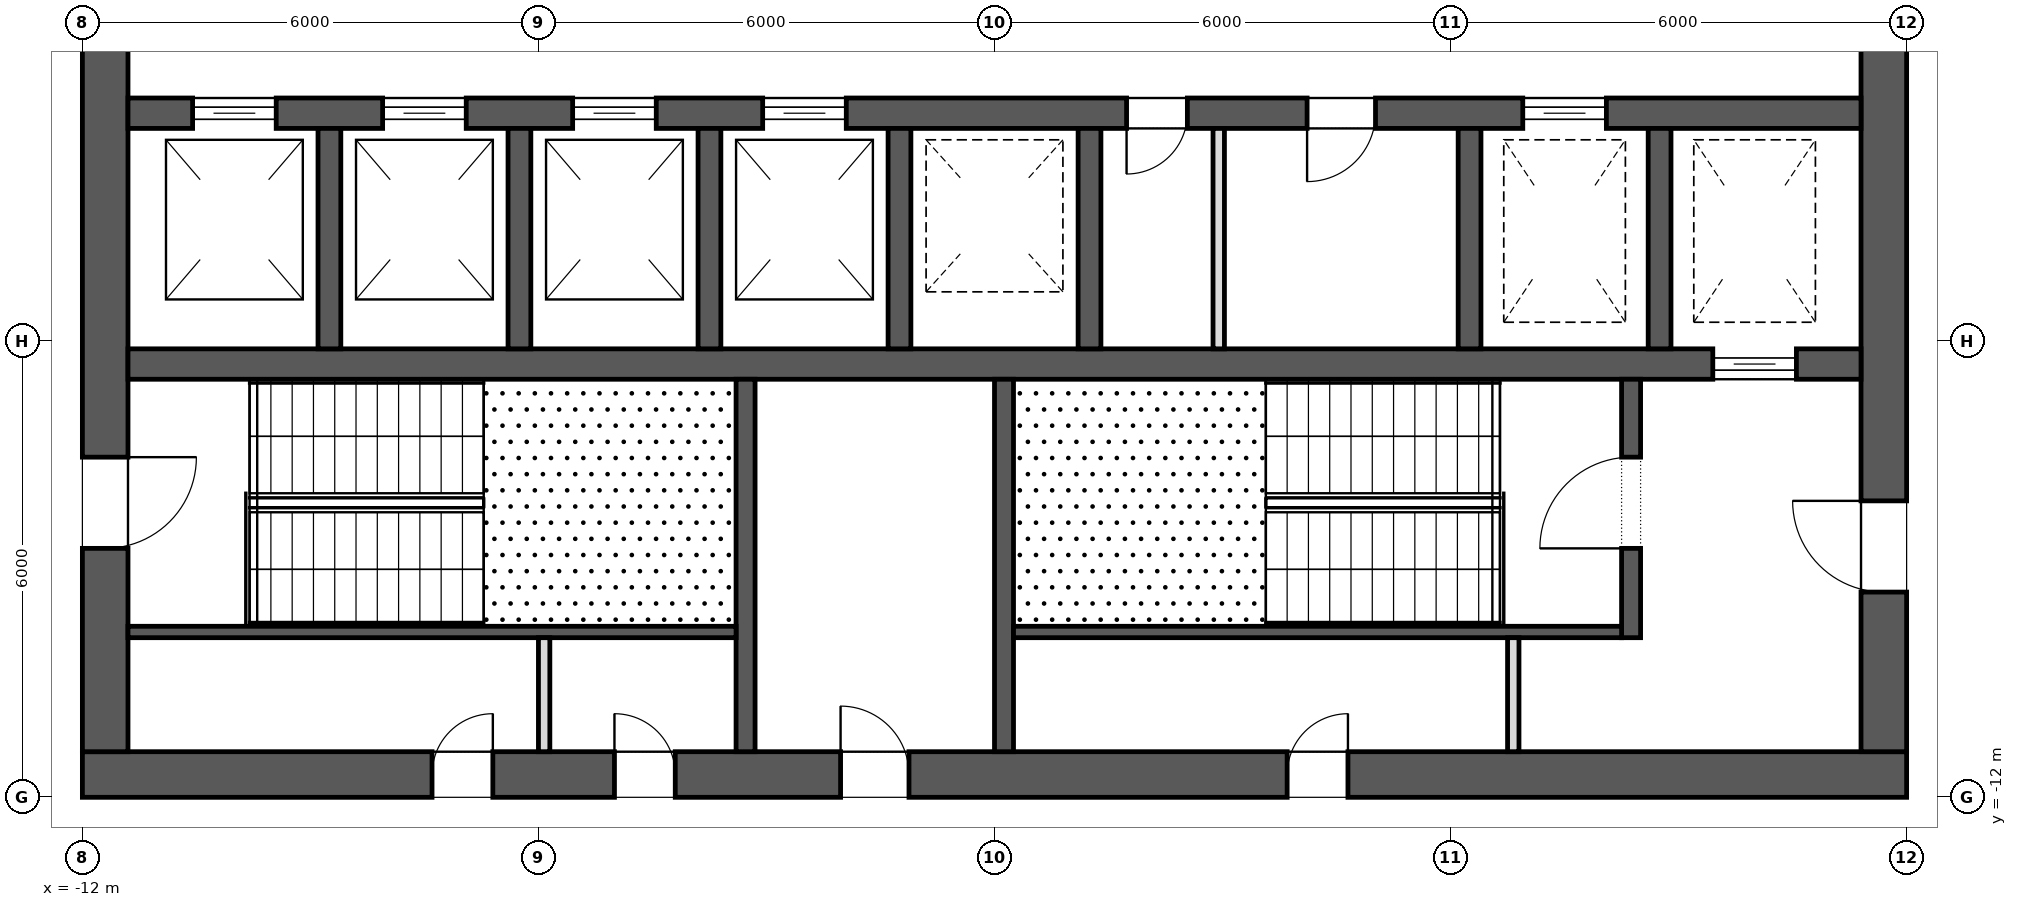
"""IFC4 building model, lengths in metres.
Left out: names, types, materials, properties, quantities, classifications, styles, units other than length and angle.
Written with IfcOpenShell. Run it as: python <this file> out.ifc"""

import sys

from ifc_helpers import new_model, si_unit, direction, frame, frame_2d, origin, place, context, subcontext, project, spatial, rectangle, extrude, element, fill, save


model = new_model("IFC4")
c1 = context("Model", 3, precision=1e-05, world=origin(), true_north=direction((0.0, 1.0)))
c2 = subcontext(c1, "Body", "Model", "MODEL_VIEW")
j1 = project(units=[si_unit("LENGTHUNIT", "METRE"), si_unit("PLANEANGLEUNIT", "RADIAN")], contexts=[c1])
p1 = place(None, origin())
s1 = spatial("IfcSite", under=j1, at=p1, CompositionType="ELEMENT")
p2 = place(p1, origin())
s2 = spatial("IfcBuilding", under=s1, at=p2, CompositionType="ELEMENT")
p3 = place(p2, frame((0.0, 0.0, 214.9)))
s3 = spatial("IfcBuildingStorey", under=s2, at=p3, CompositionType="ELEMENT", Elevation=214.9)
p4 = place(p3, frame((-12.0, -11.7, 0.0), z_axis=(0.0, 0.0, 1.0), x_axis=(1.0, 0.0, 0.0)))
e1 = element("IfcWall", 1, at=p4, inside=s3, PredefinedType="SHEAR", context=c2, shape_type="SweptSolid", body=[
    extrude(rectangle(XDim=24.0, YDim=0.6, at=frame_2d((12.0, 0.0))), origin(), (0.0, 0.0, 1.0), 4.0),
])
p5 = place(p4, frame((9.975, 0.0, 0.0)))
e2 = element("IfcOpeningElement", 2, at=p5, cuts=e1, PredefinedType="OPENING", context=c2, shape_type="SweptSolid", body=[
    extrude(rectangle(XDim=0.9, YDim=2.1, at=frame_2d((0.45, 1.05))), frame((0.0, 0.312, 0.0), z_axis=(0.0, -1.0, 0.0), x_axis=(1.0, 0.0, 0.0)), (0.0, 0.0, 1.0), 0.624),
])
p6 = place(p4, frame((4.6, 0.0, 0.0)))
e3 = element("IfcOpeningElement", 3, at=p6, cuts=e1, PredefinedType="OPENING", context=c2, shape_type="SweptSolid", body=[
    extrude(rectangle(XDim=0.8, YDim=2.1, at=frame_2d((0.4, 1.05))), frame((0.0, 0.312, 0.0), z_axis=(0.0, -1.0, 0.0), x_axis=(1.0, 0.0, 0.0)), (0.0, 0.0, 1.0), 0.624),
])
p7 = place(p4, frame((7.0, 0.0, 0.0)))
e4 = element("IfcOpeningElement", 4, at=p7, cuts=e1, PredefinedType="OPENING", context=c2, shape_type="SweptSolid", body=[
    extrude(rectangle(XDim=0.8, YDim=2.1, at=frame_2d((0.4, 1.05))), frame((0.0, 0.312, 0.0), z_axis=(0.0, -1.0, 0.0), x_axis=(1.0, 0.0, 0.0)), (0.0, 0.0, 1.0), 0.624),
])
p8 = place(p4, frame((15.85, 0.0, 0.0)))
e5 = element("IfcOpeningElement", 5, at=p8, cuts=e1, PredefinedType="OPENING", context=c2, shape_type="SweptSolid", body=[
    extrude(rectangle(XDim=0.8, YDim=2.1, at=frame_2d((0.4, 1.05))), frame((0.0, 0.312, 0.0), z_axis=(0.0, -1.0, 0.0), x_axis=(1.0, 0.0, 0.0)), (0.0, 0.0, 1.0), 0.624),
])
p9 = place(p3, frame((11.7, -11.4, 0.0), z_axis=(0.0, 0.0, 1.0), x_axis=(0.0, 1.0, 0.0)))
e6 = element("IfcWall", 6, at=p9, inside=s3, PredefinedType="SHEAR", context=c2, shape_type="SweptSolid", body=[
    extrude(rectangle(XDim=22.8, YDim=0.6, at=frame_2d((11.4, 0.0))), origin(), (0.0, 0.0, 1.0), 4.0),
])
p10 = place(p9, frame((10.2, 0.0, 0.0)))
e7 = element("IfcOpeningElement", 7, at=p10, cuts=e6, PredefinedType="OPENING", context=c2, shape_type="SweptSolid", body=[
    extrude(rectangle(XDim=2.4, YDim=2.1, at=frame_2d((1.2, 1.05))), frame((0.0, 0.312, 0.0), z_axis=(0.0, -1.0, 0.0), x_axis=(1.0, 0.0, 0.0)), (0.0, 0.0, 1.0), 0.624),
])
p11 = place(p9, frame((19.5, 0.0, 0.0)))
e8 = element("IfcOpeningElement", 8, at=p11, cuts=e6, PredefinedType="OPENING", context=c2, shape_type="SweptSolid", body=[
    extrude(rectangle(XDim=1.2, YDim=2.1, at=frame_2d((0.6, 1.05))), frame((0.0, 0.312, 0.0), z_axis=(0.0, -1.0, 0.0), x_axis=(1.0, 0.0, 0.0)), (0.0, 0.0, 1.0), 0.624),
])
p12 = place(p9, frame((2.1, 0.0, 0.0)))
e9 = element("IfcOpeningElement", 9, at=p12, cuts=e6, PredefinedType="OPENING", context=c2, shape_type="SweptSolid", body=[
    extrude(rectangle(XDim=1.2, YDim=2.1, at=frame_2d((0.6, 1.05))), frame((0.0, 0.312, 0.0), z_axis=(0.0, -1.0, 0.0), x_axis=(1.0, 0.0, 0.0)), (0.0, 0.0, 1.0), 0.624),
])
p13 = place(p3, frame((-11.7, -11.4, 0.0), z_axis=(0.0, 0.0, 1.0), x_axis=(0.0, 1.0, 0.0)))
e10 = element("IfcWall", 10, at=p13, inside=s3, PredefinedType="SHEAR", context=c2, shape_type="SweptSolid", body=[
    extrude(rectangle(XDim=22.8, YDim=0.6, at=frame_2d((11.4, 0.0))), origin(), (0.0, 0.0, 1.0), 4.0),
])
p14 = place(p13, frame((10.2, 0.0, 0.0)))
e11 = element("IfcOpeningElement", 11, at=p14, cuts=e10, PredefinedType="OPENING", context=c2, shape_type="SweptSolid", body=[
    extrude(rectangle(XDim=2.4, YDim=2.1, at=frame_2d((1.2, 1.05))), frame((0.0, 0.312, 0.0), z_axis=(0.0, -1.0, 0.0), x_axis=(1.0, 0.0, 0.0)), (0.0, 0.0, 1.0), 0.624),
])
p15 = place(p13, frame((18.925, 0.0, 0.0)))
e12 = element("IfcOpeningElement", 12, at=p15, cuts=e10, PredefinedType="OPENING", context=c2, shape_type="SweptSolid", body=[
    extrude(rectangle(XDim=1.2, YDim=2.1, at=frame_2d((0.6, 1.05))), frame((0.0, 0.312, 0.0), z_axis=(0.0, -1.0, 0.0), x_axis=(1.0, 0.0, 0.0)), (0.0, 0.0, 1.0), 0.624),
])
p16 = place(p13, frame((2.675, 0.0, 0.0)))
e13 = element("IfcOpeningElement", 13, at=p16, cuts=e10, PredefinedType="OPENING", context=c2, shape_type="SweptSolid", body=[
    extrude(rectangle(XDim=1.2, YDim=2.1, at=frame_2d((0.6, 1.05))), frame((0.0, 0.312, 0.0), z_axis=(0.0, -1.0, 0.0), x_axis=(1.0, 0.0, 0.0)), (0.0, 0.0, 1.0), 0.624),
])
p17 = place(p3, frame((-11.4, -3.0, 0.0), z_axis=(0.0, 0.0, 1.0), x_axis=(1.0, 0.0, 0.0)))
e14 = element("IfcWall", 14, at=p17, inside=s3, PredefinedType="SHEAR", context=c2, shape_type="SweptSolid", body=[
    extrude(rectangle(XDim=22.8, YDim=0.4, at=frame_2d((11.4, 0.0))), origin(), (0.0, 0.0, 1.0), 4.0),
])
p18 = place(p17, frame((0.85, 0.0, 0.0)))
e15 = element("IfcOpeningElement", 15, at=p18, cuts=e14, PredefinedType="OPENING", context=c2, shape_type="SweptSolid", body=[
    extrude(rectangle(XDim=1.1, YDim=2.1, at=frame_2d((0.55, 1.05))), frame((0.0, 0.212, 0.0), z_axis=(0.0, -1.0, 0.0), x_axis=(1.0, 0.0, 0.0)), (0.0, 0.0, 1.0), 0.424),
])
p19 = place(p17, frame((3.35, 0.0, 0.0)))
e16 = element("IfcOpeningElement", 16, at=p19, cuts=e14, PredefinedType="OPENING", context=c2, shape_type="SweptSolid", body=[
    extrude(rectangle(XDim=1.1, YDim=2.1, at=frame_2d((0.55, 1.05))), frame((0.0, 0.212, 0.0), z_axis=(0.0, -1.0, 0.0), x_axis=(1.0, 0.0, 0.0)), (0.0, 0.0, 1.0), 0.424),
])
p20 = place(p17, frame((5.85, 0.0, 0.0)))
e17 = element("IfcOpeningElement", 17, at=p20, cuts=e14, PredefinedType="OPENING", context=c2, shape_type="SweptSolid", body=[
    extrude(rectangle(XDim=1.1, YDim=2.1, at=frame_2d((0.55, 1.05))), frame((0.0, 0.212, 0.0), z_axis=(0.0, -1.0, 0.0), x_axis=(1.0, 0.0, 0.0)), (0.0, 0.0, 1.0), 0.424),
])
p21 = place(p17, frame((8.35, 0.0, 0.0)))
e18 = element("IfcOpeningElement", 18, at=p21, cuts=e14, PredefinedType="OPENING", context=c2, shape_type="SweptSolid", body=[
    extrude(rectangle(XDim=1.1, YDim=2.1, at=frame_2d((0.55, 1.05))), frame((0.0, 0.212, 0.0), z_axis=(0.0, -1.0, 0.0), x_axis=(1.0, 0.0, 0.0)), (0.0, 0.0, 1.0), 0.424),
])
p22 = place(p17, frame((18.35, 0.0, 0.0)))
e19 = element("IfcOpeningElement", 19, at=p22, cuts=e14, PredefinedType="OPENING", context=c2, shape_type="SweptSolid", body=[
    extrude(rectangle(XDim=1.1, YDim=2.1, at=frame_2d((0.55, 1.05))), frame((0.0, 0.212, 0.0), z_axis=(0.0, -1.0, 0.0), x_axis=(1.0, 0.0, 0.0)), (0.0, 0.0, 1.0), 0.424),
])
p23 = place(p17, frame((13.137, 0.0, 0.0)))
e20 = element("IfcOpeningElement", 20, at=p23, cuts=e14, PredefinedType="OPENING", context=c2, shape_type="SweptSolid", body=[
    extrude(rectangle(XDim=0.8, YDim=2.1, at=frame_2d((0.4, 1.05))), frame((0.0, 0.212, 0.0), z_axis=(0.0, -1.0, 0.0), x_axis=(1.0, 0.0, 0.0)), (0.0, 0.0, 1.0), 0.424),
])
p24 = place(p17, frame((15.512, 0.0, 0.0)))
e21 = element("IfcOpeningElement", 21, at=p24, cuts=e14, PredefinedType="OPENING", context=c2, shape_type="SweptSolid", body=[
    extrude(rectangle(XDim=0.9, YDim=2.1, at=frame_2d((0.45, 1.05))), frame((0.0, 0.212, 0.0), z_axis=(0.0, -1.0, 0.0), x_axis=(1.0, 0.0, 0.0)), (0.0, 0.0, 1.0), 0.424),
])
p25 = place(p3, frame((-11.4, -6.3, 0.0), z_axis=(0.0, 0.0, 1.0), x_axis=(1.0, 0.0, 0.0)))
e22 = element("IfcWall", 22, at=p25, inside=s3, PredefinedType="SHEAR", context=c2, shape_type="SweptSolid", body=[
    extrude(rectangle(XDim=22.8, YDim=0.4, at=frame_2d((11.4, 0.0))), origin(), (0.0, 0.0, 1.0), 4.0),
])
p26 = place(p25, frame((20.85, 0.0, 0.0)))
e23 = element("IfcOpeningElement", 23, at=p26, cuts=e22, PredefinedType="OPENING", context=c2, shape_type="SweptSolid", body=[
    extrude(rectangle(XDim=1.1, YDim=2.1, at=frame_2d((0.55, 1.05))), frame((0.0, 0.212, 0.0), z_axis=(0.0, -1.0, 0.0), x_axis=(1.0, 0.0, 0.0)), (0.0, 0.0, 1.0), 0.424),
])
for number, where, z_axis, x_axis in (
    (24, (-8.75, -6.1, 0.0), (0.0, 0.0, 1.0), (0.0, 1.0, 0.0)),
    (25, (-6.25, -6.1, 0.0), (0.0, 0.0, 1.0), (0.0, 1.0, 0.0)),
    (26, (-3.75, -6.1, 0.0), (0.0, 0.0, 1.0), (0.0, 1.0, 0.0)),
    (27, (-1.25, -6.1, 0.0), (0.0, 0.0, 1.0), (0.0, 1.0, 0.0)),
    (28, (1.25, -6.1, 0.0), (0.0, 0.0, 1.0), (0.0, 1.0, 0.0)),
    (29, (6.25, -6.1, 0.0), (0.0, 0.0, 1.0), (0.0, 1.0, 0.0)),
    (30, (8.75, -6.1, 0.0), (0.0, 0.0, 1.0), (0.0, 1.0, 0.0)),
):
    element("IfcWall", number, at=place(p3, frame(where, z_axis=z_axis, x_axis=x_axis)), inside=s3, PredefinedType="SHEAR", context=c2, shape_type="SweptSolid", body=[
        extrude(rectangle(XDim=2.9, YDim=0.3, at=frame_2d((1.45, 0.0))), origin(), (0.0, 0.0, 1.0), 4.0),
    ])
for number, where, z_axis, x_axis in (
    (31, (-3.275, -11.4, 0.0), (0.0, 0.0, 1.0), (0.0, 1.0, 0.0)),
    (32, (0.125, -11.4, 0.0), (0.0, 0.0, 1.0), (0.0, 1.0, 0.0)),
):
    element("IfcWall", number, at=place(p3, frame(where, z_axis=z_axis, x_axis=x_axis)), inside=s3, PredefinedType="SHEAR", context=c2, shape_type="SweptSolid", body=[
        extrude(rectangle(XDim=4.9, YDim=0.25, at=frame_2d((2.45, 0.0))), origin(), (0.0, 0.0, 1.0), 3.7),
    ])
p27 = place(p3, frame((8.375, -9.9, 0.0), z_axis=(0.0, 0.0, 1.0), x_axis=(0.0, 1.0, 0.0)))
e33 = element("IfcWall", 33, at=p27, inside=s3, PredefinedType="SHEAR", context=c2, shape_type="SweptSolid", body=[
    extrude(rectangle(XDim=3.4, YDim=0.25, at=frame_2d((1.7, 0.0))), origin(), (0.0, 0.0, 1.0), 3.7),
])
p28 = place(p27, frame((1.175, 0.0, 0.0)))
e34 = element("IfcOpeningElement", 34, at=p28, cuts=e33, PredefinedType="OPENING", context=c2, shape_type="SweptSolid", body=[
    extrude(rectangle(XDim=1.2, YDim=2.1, at=frame_2d((0.6, 1.05))), frame((0.0, 0.137, 0.0), z_axis=(0.0, -1.0, 0.0), x_axis=(1.0, 0.0, 0.0)), (0.0, 0.0, 1.0), 0.274),
])
for number, where, z_axis, x_axis in (
    (35, (-11.4, -9.825, 0.0), (0.0, 0.0, 1.0), (1.0, 0.0, 0.0)),
    (36, (0.25, -9.825, 0.0), (0.0, 0.0, 1.0), (1.0, 0.0, 0.0)),
):
    element("IfcWall", number, at=place(p3, frame(where, z_axis=z_axis, x_axis=x_axis)), inside=s3, PredefinedType="SHEAR", context=c2, shape_type="SweptSolid", body=[
        extrude(rectangle(XDim=8.0, YDim=0.15, at=frame_2d((4.0, 0.0))), origin(), (0.0, 0.0, 1.0), 3.7),
    ])
for number, where, z_axis, x_axis in (
    (37, (-5.925, -11.4, 0.0), (0.0, 0.0, 1.0), (0.0, 1.0, 0.0)),
    (38, (6.825, -11.4, 0.0), (0.0, 0.0, 1.0), (0.0, 1.0, 0.0)),
):
    element("IfcWall", number, at=place(p3, frame(where, z_axis=z_axis, x_axis=x_axis)), inside=s3, PredefinedType="PARTITIONING", context=c2, shape_type="SweptSolid", body=[
        extrude(rectangle(XDim=1.5, YDim=0.15, at=frame_2d((0.75, 0.0))), origin(), (0.0, 0.0, 1.0), 3.7),
    ])
p29 = place(p3, frame((2.95, -6.1, 0.0), z_axis=(0.0, 0.0, 1.0), x_axis=(0.0, 1.0, 0.0)))
e39 = element("IfcWall", 39, at=p29, inside=s3, PredefinedType="PARTITIONING", context=c2, shape_type="SweptSolid", body=[
    extrude(rectangle(XDim=2.9, YDim=0.15, at=frame_2d((1.45, 0.0))), origin(), (0.0, 0.0, 1.0), 3.7),
])
p30 = place(p26, origin())
e40 = element("IfcDoor", 40, at=p30, inside=s3, OperationType="SLIDING_TO_LEFT", PredefinedType="DOOR", context=c2, shape_type="SweptSolid", body=[
    extrude(rectangle(XDim=1.1, YDim=2.1, at=frame_2d((0.55, 1.05))), frame((0.0, 0.025, 0.0), z_axis=(0.0, -1.0, 0.0), x_axis=(1.0, 0.0, 0.0)), (0.0, 0.0, 1.0), 0.05),
])
fill(e23, e40)
p31 = place(p18, origin())
e41 = element("IfcDoor", 41, at=p31, inside=s3, OperationType="SLIDING_TO_LEFT", PredefinedType="DOOR", context=c2, shape_type="SweptSolid", body=[
    extrude(rectangle(XDim=1.1, YDim=2.1, at=frame_2d((0.55, 1.05))), frame((0.0, 0.025, 0.0), z_axis=(0.0, -1.0, 0.0), x_axis=(1.0, 0.0, 0.0)), (0.0, 0.0, 1.0), 0.05),
])
fill(e15, e41)
p32 = place(p19, origin())
e42 = element("IfcDoor", 42, at=p32, inside=s3, OperationType="SLIDING_TO_LEFT", PredefinedType="DOOR", context=c2, shape_type="SweptSolid", body=[
    extrude(rectangle(XDim=1.1, YDim=2.1, at=frame_2d((0.55, 1.05))), frame((0.0, 0.025, 0.0), z_axis=(0.0, -1.0, 0.0), x_axis=(1.0, 0.0, 0.0)), (0.0, 0.0, 1.0), 0.05),
])
fill(e16, e42)
p33 = place(p20, origin())
e43 = element("IfcDoor", 43, at=p33, inside=s3, OperationType="SLIDING_TO_LEFT", PredefinedType="DOOR", context=c2, shape_type="SweptSolid", body=[
    extrude(rectangle(XDim=1.1, YDim=2.1, at=frame_2d((0.55, 1.05))), frame((0.0, 0.025, 0.0), z_axis=(0.0, -1.0, 0.0), x_axis=(1.0, 0.0, 0.0)), (0.0, 0.0, 1.0), 0.05),
])
fill(e17, e43)
p34 = place(p21, origin())
e44 = element("IfcDoor", 44, at=p34, inside=s3, OperationType="SLIDING_TO_LEFT", PredefinedType="DOOR", context=c2, shape_type="SweptSolid", body=[
    extrude(rectangle(XDim=1.1, YDim=2.1, at=frame_2d((0.55, 1.05))), frame((0.0, 0.025, 0.0), z_axis=(0.0, -1.0, 0.0), x_axis=(1.0, 0.0, 0.0)), (0.0, 0.0, 1.0), 0.05),
])
fill(e18, e44)
p35 = place(p22, origin())
e45 = element("IfcDoor", 45, at=p35, inside=s3, OperationType="SLIDING_TO_LEFT", PredefinedType="DOOR", context=c2, shape_type="SweptSolid", body=[
    extrude(rectangle(XDim=1.1, YDim=2.1, at=frame_2d((0.55, 1.05))), frame((0.0, 0.025, 0.0), z_axis=(0.0, -1.0, 0.0), x_axis=(1.0, 0.0, 0.0)), (0.0, 0.0, 1.0), 0.05),
])
fill(e19, e45)
p36 = place(p16, frame((1.2, 0.0, 0.0), z_axis=(0.0, 0.0, 1.0), x_axis=(-1.0, 0.0, 0.0)))
e46 = element("IfcDoor", 46, at=p36, inside=s3, OperationType="SINGLE_SWING_RIGHT", PredefinedType="DOOR", context=c2, shape_type="SweptSolid", body=[
    extrude(rectangle(XDim=1.2, YDim=2.1, at=frame_2d((0.6, 1.05))), frame((0.0, 0.025, 0.0), z_axis=(0.0, -1.0, 0.0), x_axis=(1.0, 0.0, 0.0)), (0.0, 0.0, 1.0), 0.05),
])
fill(e13, e46)
p37 = place(p28, origin())
e47 = element("IfcDoor", 47, at=p37, inside=s3, OperationType="SINGLE_SWING_RIGHT", PredefinedType="DOOR", context=c2, shape_type="SweptSolid", body=[
    extrude(rectangle(XDim=1.2, YDim=2.1, at=frame_2d((0.6, 1.05))), frame((0.0, 0.025, 0.0), z_axis=(0.0, -1.0, 0.0), x_axis=(1.0, 0.0, 0.0)), (0.0, 0.0, 1.0), 0.05),
])
fill(e34, e47)
p38 = place(p12, origin())
e48 = element("IfcDoor", 48, at=p38, inside=s3, OperationType="SINGLE_SWING_LEFT", PredefinedType="DOOR", context=c2, shape_type="SweptSolid", body=[
    extrude(rectangle(XDim=1.2, YDim=2.1, at=frame_2d((0.6, 1.05))), frame((0.0, 0.025, 0.0), z_axis=(0.0, -1.0, 0.0), x_axis=(1.0, 0.0, 0.0)), (0.0, 0.0, 1.0), 0.05),
])
fill(e9, e48)
p39 = place(p5, origin())
e49 = element("IfcDoor", 49, at=p39, inside=s3, OperationType="SINGLE_SWING_RIGHT", PredefinedType="DOOR", context=c2, shape_type="SweptSolid", body=[
    extrude(rectangle(XDim=0.9, YDim=2.1, at=frame_2d((0.45, 1.05))), frame((0.0, 0.025, 0.0), z_axis=(0.0, -1.0, 0.0), x_axis=(1.0, 0.0, 0.0)), (0.0, 0.0, 1.0), 0.05),
])
fill(e2, e49)
p40 = place(p6, origin())
e50 = element("IfcDoor", 50, at=p40, inside=s3, OperationType="SINGLE_SWING_LEFT", PredefinedType="DOOR", context=c2, shape_type="SweptSolid", body=[
    extrude(rectangle(XDim=0.8, YDim=2.1, at=frame_2d((0.4, 1.05))), frame((0.0, 0.025, 0.0), z_axis=(0.0, -1.0, 0.0), x_axis=(1.0, 0.0, 0.0)), (0.0, 0.0, 1.0), 0.05),
])
fill(e3, e50)
p41 = place(p7, origin())
e51 = element("IfcDoor", 51, at=p41, inside=s3, OperationType="SINGLE_SWING_RIGHT", PredefinedType="DOOR", context=c2, shape_type="SweptSolid", body=[
    extrude(rectangle(XDim=0.8, YDim=2.1, at=frame_2d((0.4, 1.05))), frame((0.0, 0.025, 0.0), z_axis=(0.0, -1.0, 0.0), x_axis=(1.0, 0.0, 0.0)), (0.0, 0.0, 1.0), 0.05),
])
fill(e4, e51)
p42 = place(p8, origin())
e52 = element("IfcDoor", 52, at=p42, inside=s3, OperationType="SINGLE_SWING_LEFT", PredefinedType="DOOR", context=c2, shape_type="SweptSolid", body=[
    extrude(rectangle(XDim=0.8, YDim=2.1, at=frame_2d((0.4, 1.05))), frame((0.0, 0.025, 0.0), z_axis=(0.0, -1.0, 0.0), x_axis=(1.0, 0.0, 0.0)), (0.0, 0.0, 1.0), 0.05),
])
fill(e5, e52)
p43 = place(p23, frame((0.8, 0.0, 0.0), z_axis=(0.0, 0.0, 1.0), x_axis=(-1.0, 0.0, 0.0)))
e53 = element("IfcDoor", 53, at=p43, inside=s3, OperationType="SINGLE_SWING_LEFT", PredefinedType="DOOR", context=c2, shape_type="SweptSolid", body=[
    extrude(rectangle(XDim=0.8, YDim=2.1, at=frame_2d((0.4, 1.05))), frame((0.0, 0.025, 0.0), z_axis=(0.0, -1.0, 0.0), x_axis=(1.0, 0.0, 0.0)), (0.0, 0.0, 1.0), 0.05),
])
fill(e20, e53)
p44 = place(p24, frame((0.9, 0.0, 0.0), z_axis=(0.0, 0.0, 1.0), x_axis=(-1.0, 0.0, 0.0)))
e54 = element("IfcDoor", 54, at=p44, inside=s3, OperationType="SINGLE_SWING_LEFT", PredefinedType="DOOR", context=c2, shape_type="SweptSolid", body=[
    extrude(rectangle(XDim=0.9, YDim=2.1, at=frame_2d((0.45, 1.05))), frame((0.0, 0.025, 0.0), z_axis=(0.0, -1.0, 0.0), x_axis=(1.0, 0.0, 0.0)), (0.0, 0.0, 1.0), 0.05),
])
fill(e21, e54)
save(model, sys.argv[1])
